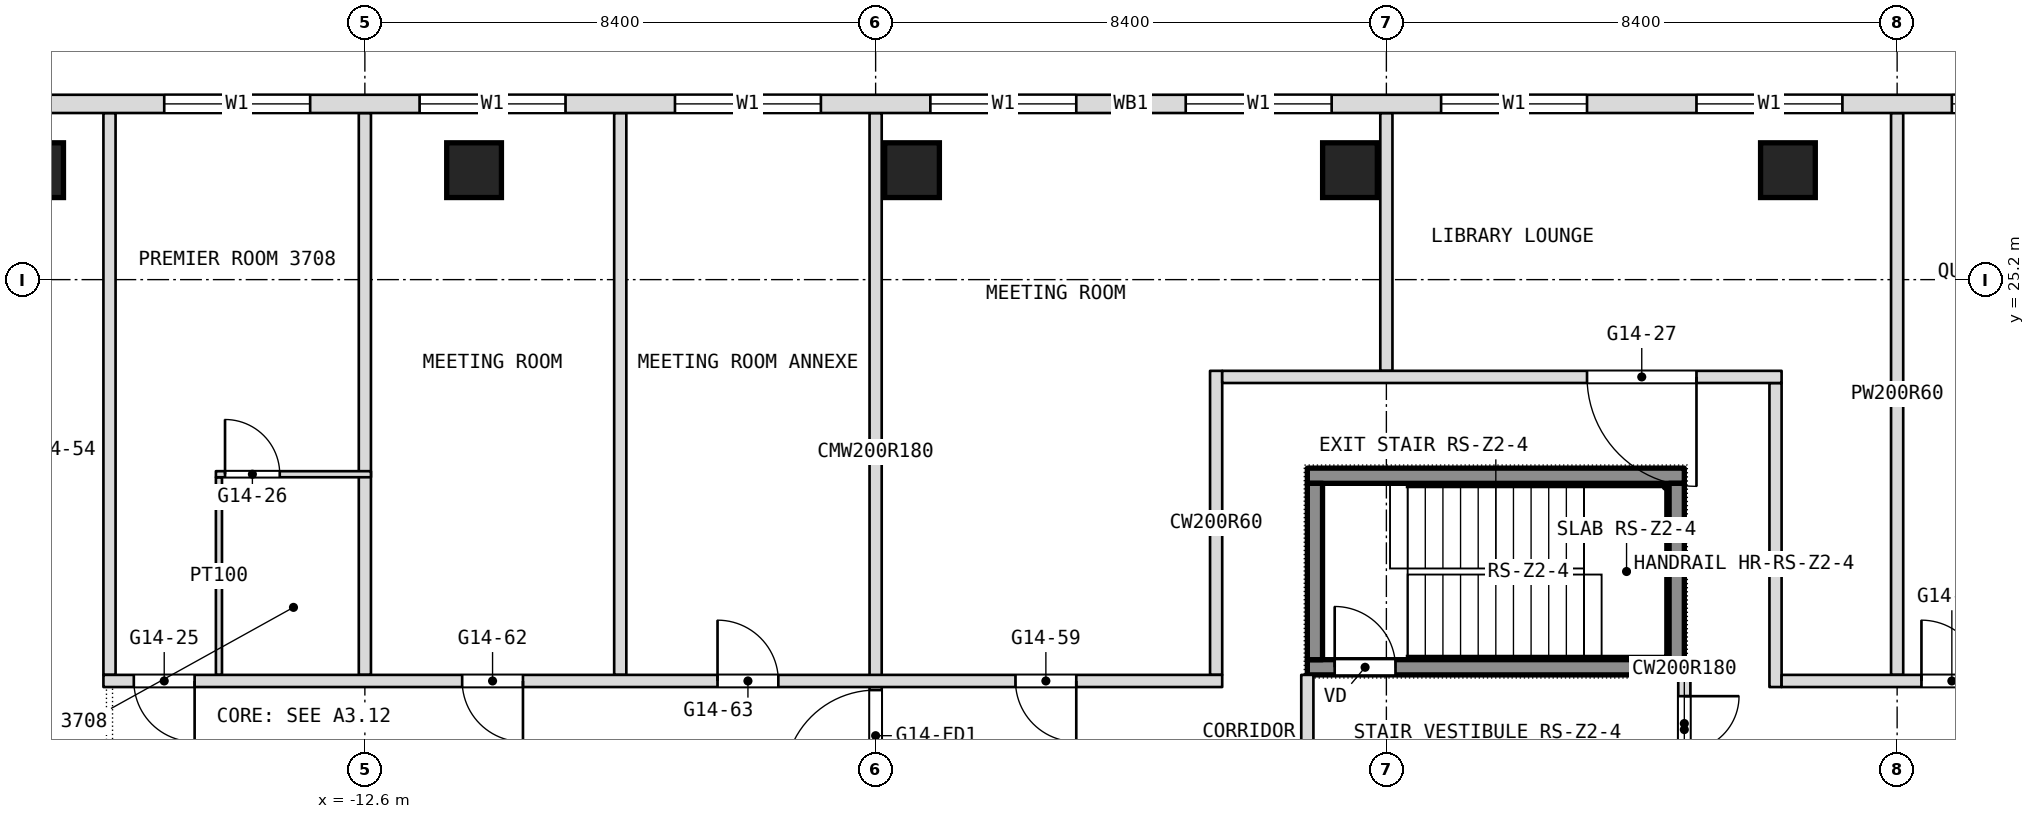
"""IFC4 building model, lengths in metres.
Left out: names, types, materials, properties, quantities, classifications, styles, units other than length and angle.
Written with IfcOpenShell. Run it as: python <this file> out.ifc"""

import sys

from ifc_helpers import new_model, si_unit, direction, frame, frame_2d, origin, origin_2d, place, context, subcontext, project, spatial, rectangle, extrude, element, fill, save


model = new_model("IFC4")
c1 = context("Model", 3, precision=1e-05, world=origin(), true_north=direction((0.0, 1.0)))
c2 = subcontext(c1, "Body", "Model", "MODEL_VIEW")
j1 = project(units=[si_unit("LENGTHUNIT", "METRE"), si_unit("PLANEANGLEUNIT", "RADIAN")], contexts=[c1])
p1 = place(None, origin())
s1 = spatial("IfcSite", under=j1, at=p1, CompositionType="ELEMENT")
p2 = place(p1, origin())
s2 = spatial("IfcBuilding", under=s1, at=p2, CompositionType="ELEMENT")
p3 = place(p2, frame((0.0, 0.0, 158.9)))
s3 = spatial("IfcBuildingStorey", under=s2, at=p3, CompositionType="ELEMENT", Elevation=158.9)
for number, where, z_axis, x_axis in (
    (1, (-18.007, 27.0, 0.0), (0.0, 0.0, 1.0), (1.0, 0.0, 0.0)),
    (2, (-10.804, 27.0, 0.0), (0.0, 0.0, 1.0), (1.0, 0.0, 0.0)),
    (3, (-3.601, 27.0, 0.0), (0.0, 0.0, 1.0), (1.0, 0.0, 0.0)),
    (4, (3.601, 27.0, 0.0), (0.0, 0.0, 1.0), (1.0, 0.0, 0.0)),
    (5, (10.804, 27.0, 0.0), (0.0, 0.0, 1.0), (1.0, 0.0, 0.0)),
):
    element("IfcColumn", number, at=place(p3, frame(where, z_axis=z_axis, x_axis=x_axis)), inside=s3, PredefinedType="COLUMN", context=c2, shape_type="SweptSolid", body=[
        extrude(rectangle(XDim=0.9, YDim=0.9, at=origin_2d()), origin(), (0.0, 0.0, 1.0), 3.6),
    ])
p4 = place(p3, frame((12.6, 18.7, 0.0), z_axis=(0.0, 0.0, 1.0), x_axis=(0.0, 1.0, 0.0)))
e6 = element("IfcWall", 6, at=p4, inside=s3, PredefinedType="PARTITIONING", context=c2, shape_type="SweptSolid", body=[
    extrude(rectangle(XDim=9.24, YDim=0.2, at=frame_2d((4.62, 0.0))), origin(), (0.0, 0.0, 1.0), 3.34),
])
p5 = place(p3, frame((10.6, 18.5, 0.0), z_axis=(0.0, 0.0, 1.0), x_axis=(0.0, 1.0, 0.0)))
e7 = element("IfcWall", 7, at=p5, inside=s3, PredefinedType="PARTITIONING", context=c2, shape_type="SweptSolid", body=[
    extrude(rectangle(XDim=5.0, YDim=0.2, at=frame_2d((2.5, 0.0))), origin(), (0.0, 0.0, 1.0), 3.34),
])
p6 = place(p3, frame((9.1, 16.9, 0.0), z_axis=(0.0, 0.0, 1.0), x_axis=(0.0, 1.0, 0.0)))
e8 = element("IfcWall", 8, at=p6, inside=s3, PredefinedType="PARTITIONING", context=c2, shape_type="SweptSolid", body=[
    extrude(rectangle(XDim=1.8, YDim=0.2, at=frame_2d((0.9, 0.0))), origin(), (0.0, 0.0, 1.0), 3.34),
])
p7 = place(p6, frame((0.55, 0.0, 0.0)))
e9 = element("IfcOpeningElement", 9, at=p7, cuts=e8, PredefinedType="OPENING", context=c2, shape_type="SweptSolid", body=[
    extrude(rectangle(XDim=0.9, YDim=2.1, at=frame_2d((0.45, 1.05))), frame((0.0, 0.1, 0.0), z_axis=(0.0, -1.0, 0.0), x_axis=(1.0, 0.0, 0.0)), (0.0, 0.0, 1.0), 0.2),
])
p8 = place(p3, frame((4.2, 23.7, 0.0), z_axis=(0.0, 0.0, 1.0), x_axis=(0.0, 1.0, 0.0)))
e10 = element("IfcWall", 10, at=p8, inside=s3, PredefinedType="PARTITIONING", context=c2, shape_type="SweptSolid", body=[
    extrude(rectangle(XDim=4.24, YDim=0.2, at=frame_2d((2.12, 0.0))), origin(), (0.0, 0.0, 1.0), 3.34),
])
p9 = place(p3, frame((2.9, 16.9, 0.0), z_axis=(0.0, 0.0, 1.0), x_axis=(0.0, 1.0, 0.0)))
e11 = element("IfcWall", 11, at=p9, inside=s3, PredefinedType="PARTITIONING", context=c2, shape_type="SweptSolid", body=[
    extrude(rectangle(XDim=1.8, YDim=0.2, at=frame_2d((0.9, 0.0))), origin(), (0.0, 0.0, 1.0), 3.34),
])
p10 = place(p3, frame((1.4, 18.7, 0.0), z_axis=(0.0, 0.0, 1.0), x_axis=(0.0, 1.0, 0.0)))
e12 = element("IfcWall", 12, at=p10, inside=s3, PredefinedType="PARTITIONING", context=c2, shape_type="SweptSolid", body=[
    extrude(rectangle(XDim=5.0, YDim=0.2, at=frame_2d((2.5, 0.0))), origin(), (0.0, 0.0, 1.0), 3.34),
])
p11 = place(p3, frame((-4.2, 16.8, 0.0), z_axis=(0.0, 0.0, 1.0), x_axis=(0.0, 1.0, 0.0)))
e13 = element("IfcWall", 13, at=p11, inside=s3, PredefinedType="PARTITIONING", context=c2, shape_type="SweptSolid", body=[
    extrude(rectangle(XDim=11.14, YDim=0.2, at=frame_2d((5.57, 0.0))), origin(), (0.0, 0.0, 1.0), 3.34),
])
p12 = place(p11, frame((0.15, 0.0, 0.0)))
e14 = element("IfcOpeningElement", 14, at=p12, cuts=e13, PredefinedType="OPENING", context=c2, shape_type="SweptSolid", body=[
    extrude(rectangle(XDim=1.5, YDim=2.1, at=frame_2d((0.75, 1.05))), frame((0.0, 0.1, 0.0), z_axis=(0.0, -1.0, 0.0), x_axis=(1.0, 0.0, 0.0)), (0.0, 0.0, 1.0), 0.2),
])
for number, where, z_axis, x_axis in (
    (15, (-8.4, 18.7, 0.0), (0.0, 0.0, 1.0), (0.0, 1.0, 0.0)),
    (16, (-12.6, 18.7, 0.0), (0.0, 0.0, 1.0), (0.0, 1.0, 0.0)),
):
    element("IfcWall", number, at=place(p3, frame(where, z_axis=z_axis, x_axis=x_axis)), inside=s3, PredefinedType="PARTITIONING", context=c2, shape_type="SweptSolid", body=[
        extrude(rectangle(XDim=9.24, YDim=0.2, at=frame_2d((4.62, 0.0))), origin(), (0.0, 0.0, 1.0), 3.34),
    ])
p13 = place(p3, frame((-15.0, 18.7, 0.0), z_axis=(0.0, 0.0, 1.0), x_axis=(0.0, 1.0, 0.0)))
e17 = element("IfcWall", 17, at=p13, inside=s3, PredefinedType="PARTITIONING", context=c2, shape_type="SweptSolid", body=[
    extrude(rectangle(XDim=3.25, YDim=0.1, at=frame_2d((1.625, 0.0))), origin(), (0.0, 0.0, 1.0), 3.34),
])
p14 = place(p3, frame((-16.8, 18.7, 0.0), z_axis=(0.0, 0.0, 1.0), x_axis=(0.0, 1.0, 0.0)))
e18 = element("IfcWall", 18, at=p14, inside=s3, PredefinedType="PARTITIONING", context=c2, shape_type="SweptSolid", body=[
    extrude(rectangle(XDim=9.24, YDim=0.2, at=frame_2d((4.62, 0.0))), origin(), (0.0, 0.0, 1.0), 3.34),
])
p15 = place(p3, frame((-16.9, 18.6, 0.0), z_axis=(0.0, 0.0, 1.0), x_axis=(1.0, 0.0, 0.0)))
e19 = element("IfcWall", 19, at=p15, inside=s3, PredefinedType="PARTITIONING", context=c2, shape_type="SweptSolid", body=[
    extrude(rectangle(XDim=18.4, YDim=0.2, at=frame_2d((9.2, 0.0))), origin(), (0.0, 0.0, 1.0), 3.34),
])
p16 = place(p15, frame((0.5, 0.0, 0.0)))
e20 = element("IfcOpeningElement", 20, at=p16, cuts=e19, PredefinedType="OPENING", context=c2, shape_type="SweptSolid", body=[
    extrude(rectangle(XDim=1.0, YDim=2.1, at=frame_2d((0.5, 1.05))), frame((0.0, 0.1, 0.0), z_axis=(0.0, -1.0, 0.0), x_axis=(1.0, 0.0, 0.0)), (0.0, 0.0, 1.0), 0.2),
])
p17 = place(p15, frame((15.0, 0.0, 0.0)))
e21 = element("IfcOpeningElement", 21, at=p17, cuts=e19, PredefinedType="OPENING", context=c2, shape_type="SweptSolid", body=[
    extrude(rectangle(XDim=1.0, YDim=2.1, at=frame_2d((0.5, 1.05))), frame((0.0, 0.1, 0.0), z_axis=(0.0, -1.0, 0.0), x_axis=(1.0, 0.0, 0.0)), (0.0, 0.0, 1.0), 0.2),
])
p18 = place(p15, frame((5.9, 0.0, 0.0)))
e22 = element("IfcOpeningElement", 22, at=p18, cuts=e19, PredefinedType="OPENING", context=c2, shape_type="SweptSolid", body=[
    extrude(rectangle(XDim=1.0, YDim=2.1, at=frame_2d((0.5, 1.05))), frame((0.0, 0.1, 0.0), z_axis=(0.0, -1.0, 0.0), x_axis=(1.0, 0.0, 0.0)), (0.0, 0.0, 1.0), 0.2),
])
p19 = place(p15, frame((10.1, 0.0, 0.0)))
e23 = element("IfcOpeningElement", 23, at=p19, cuts=e19, PredefinedType="OPENING", context=c2, shape_type="SweptSolid", body=[
    extrude(rectangle(XDim=1.0, YDim=2.1, at=frame_2d((0.5, 1.05))), frame((0.0, 0.1, 0.0), z_axis=(0.0, -1.0, 0.0), x_axis=(1.0, 0.0, 0.0)), (0.0, 0.0, 1.0), 0.2),
])
p20 = place(p3, frame((10.7, 18.6, 0.0), z_axis=(0.0, 0.0, 1.0), x_axis=(1.0, 0.0, 0.0)))
e24 = element("IfcWall", 24, at=p20, inside=s3, PredefinedType="PARTITIONING", context=c2, shape_type="SweptSolid", body=[
    extrude(rectangle(XDim=6.2, YDim=0.2, at=frame_2d((3.1, 0.0))), origin(), (0.0, 0.0, 1.0), 3.34),
])
p21 = place(p20, frame((2.3, 0.0, 0.0)))
e25 = element("IfcOpeningElement", 25, at=p21, cuts=e24, PredefinedType="OPENING", context=c2, shape_type="SweptSolid", body=[
    extrude(rectangle(XDim=1.0, YDim=2.1, at=frame_2d((0.5, 1.05))), frame((0.0, 0.1, 0.0), z_axis=(0.0, -1.0, 0.0), x_axis=(1.0, 0.0, 0.0)), (0.0, 0.0, 1.0), 0.2),
])
p22 = place(p3, frame((-15.05, 22.0, 0.0), z_axis=(0.0, 0.0, 1.0), x_axis=(1.0, 0.0, 0.0)))
e26 = element("IfcWall", 26, at=p22, inside=s3, PredefinedType="PARTITIONING", context=c2, shape_type="SweptSolid", body=[
    extrude(rectangle(XDim=2.55, YDim=0.1, at=frame_2d((1.275, 0.0))), origin(), (0.0, 0.0, 1.0), 3.34),
])
p23 = place(p22, frame((0.15, 0.0, 0.0)))
e27 = element("IfcOpeningElement", 27, at=p23, cuts=e26, PredefinedType="OPENING", context=c2, shape_type="SweptSolid", body=[
    extrude(rectangle(XDim=0.9, YDim=2.1, at=frame_2d((0.45, 1.05))), frame((0.0, 0.05, 0.0), z_axis=(0.0, -1.0, 0.0), x_axis=(1.0, 0.0, 0.0)), (0.0, 0.0, 1.0), 0.1),
])
p24 = place(p3, frame((1.5, 23.6, 0.0), z_axis=(0.0, 0.0, 1.0), x_axis=(1.0, 0.0, 0.0)))
e28 = element("IfcWall", 28, at=p24, inside=s3, PredefinedType="PARTITIONING", context=c2, shape_type="SweptSolid", body=[
    extrude(rectangle(XDim=9.2, YDim=0.2, at=frame_2d((4.6, 0.0))), origin(), (0.0, 0.0, 1.0), 3.34),
])
p25 = place(p24, frame((6.0, 0.0, 0.0)))
e29 = element("IfcOpeningElement", 29, at=p25, cuts=e28, PredefinedType="OPENING", context=c2, shape_type="SweptSolid", body=[
    extrude(rectangle(XDim=1.8, YDim=2.1, at=frame_2d((0.9, 1.05))), frame((0.0, 0.1, 0.0), z_axis=(0.0, -1.0, 0.0), x_axis=(1.0, 0.0, 0.0)), (0.0, 0.0, 1.0), 0.2),
])
p26 = place(p3, frame((21.306, 28.09, 0.0), z_axis=(0.0, 0.0, 1.0), x_axis=(-1.0, 0.0, 0.0)))
e30 = element("IfcWall", 30, at=p26, inside=s3, PredefinedType="NOTDEFINED", context=c2, shape_type="SweptSolid", body=[
    extrude(rectangle(XDim=42.612, YDim=0.3, at=frame_2d((21.306, 0.0))), origin(), (0.0, 0.0, 1.0), 3.6),
])
p27 = place(p26, frame((5.406, 0.0, 0.9)))
e31 = element("IfcOpeningElement", 31, at=p27, cuts=e30, PredefinedType="OPENING", context=c2, shape_type="SweptSolid", body=[
    extrude(rectangle(XDim=2.4, YDim=2.1, at=frame_2d((1.2, 1.05))), frame((0.0, 0.15, 0.0), z_axis=(0.0, -1.0, 0.0), x_axis=(1.0, 0.0, 0.0)), (0.0, 0.0, 1.0), 0.3),
])
p28 = place(p26, frame((9.606, 0.0, 0.9)))
e32 = element("IfcOpeningElement", 32, at=p28, cuts=e30, PredefinedType="OPENING", context=c2, shape_type="SweptSolid", body=[
    extrude(rectangle(XDim=2.4, YDim=2.1, at=frame_2d((1.2, 1.05))), frame((0.0, 0.15, 0.0), z_axis=(0.0, -1.0, 0.0), x_axis=(1.0, 0.0, 0.0)), (0.0, 0.0, 1.0), 0.3),
])
p29 = place(p26, frame((13.806, 0.0, 0.9)))
e33 = element("IfcOpeningElement", 33, at=p29, cuts=e30, PredefinedType="OPENING", context=c2, shape_type="SweptSolid", body=[
    extrude(rectangle(XDim=2.4, YDim=2.1, at=frame_2d((1.2, 1.05))), frame((0.0, 0.15, 0.0), z_axis=(0.0, -1.0, 0.0), x_axis=(1.0, 0.0, 0.0)), (0.0, 0.0, 1.0), 0.3),
])
p30 = place(p26, frame((18.006, 0.0, 0.9)))
e34 = element("IfcOpeningElement", 34, at=p30, cuts=e30, PredefinedType="OPENING", context=c2, shape_type="SweptSolid", body=[
    extrude(rectangle(XDim=2.4, YDim=2.1, at=frame_2d((1.2, 1.05))), frame((0.0, 0.15, 0.0), z_axis=(0.0, -1.0, 0.0), x_axis=(1.0, 0.0, 0.0)), (0.0, 0.0, 1.0), 0.3),
])
p31 = place(p26, frame((22.206, 0.0, 0.9)))
e35 = element("IfcOpeningElement", 35, at=p31, cuts=e30, PredefinedType="OPENING", context=c2, shape_type="SweptSolid", body=[
    extrude(rectangle(XDim=2.4, YDim=2.1, at=frame_2d((1.2, 1.05))), frame((0.0, 0.15, 0.0), z_axis=(0.0, -1.0, 0.0), x_axis=(1.0, 0.0, 0.0)), (0.0, 0.0, 1.0), 0.3),
])
p32 = place(p26, frame((26.406, 0.0, 0.9)))
e36 = element("IfcOpeningElement", 36, at=p32, cuts=e30, PredefinedType="OPENING", context=c2, shape_type="SweptSolid", body=[
    extrude(rectangle(XDim=2.4, YDim=2.1, at=frame_2d((1.2, 1.05))), frame((0.0, 0.15, 0.0), z_axis=(0.0, -1.0, 0.0), x_axis=(1.0, 0.0, 0.0)), (0.0, 0.0, 1.0), 0.3),
])
p33 = place(p26, frame((30.606, 0.0, 0.9)))
e37 = element("IfcOpeningElement", 37, at=p33, cuts=e30, PredefinedType="OPENING", context=c2, shape_type="SweptSolid", body=[
    extrude(rectangle(XDim=2.4, YDim=2.1, at=frame_2d((1.2, 1.05))), frame((0.0, 0.15, 0.0), z_axis=(0.0, -1.0, 0.0), x_axis=(1.0, 0.0, 0.0)), (0.0, 0.0, 1.0), 0.3),
])
p34 = place(p26, frame((34.806, 0.0, 0.9)))
e38 = element("IfcOpeningElement", 38, at=p34, cuts=e30, PredefinedType="OPENING", context=c2, shape_type="SweptSolid", body=[
    extrude(rectangle(XDim=2.4, YDim=2.1, at=frame_2d((1.2, 1.05))), frame((0.0, 0.15, 0.0), z_axis=(0.0, -1.0, 0.0), x_axis=(1.0, 0.0, 0.0)), (0.0, 0.0, 1.0), 0.3),
])
p35 = place(p3, frame((2.9, 18.825, 0.1), z_axis=(0.0, 0.0, 1.0), x_axis=(1.0, 0.0, 0.0)))
e39 = element("IfcWall", 39, at=p35, inside=s3, PredefinedType="SHEAR", context=c2, shape_type="SweptSolid", body=[
    extrude(rectangle(XDim=6.2, YDim=0.25, at=frame_2d((3.1, 0.0))), origin(), (0.0, 0.0, 1.0), 3.6),
])
p36 = place(p35, frame((0.45, 0.0, 0.0)))
e40 = element("IfcOpeningElement", 40, at=p36, cuts=e39, PredefinedType="OPENING", context=c2, shape_type="SweptSolid", body=[
    extrude(rectangle(XDim=1.0, YDim=2.1, at=frame_2d((0.5, 1.05))), frame((0.0, 0.125, 0.0), z_axis=(0.0, -1.0, 0.0), x_axis=(1.0, 0.0, 0.0)), (0.0, 0.0, 1.0), 0.25),
])
p37 = place(p3, frame((2.9, 21.975, 0.1), z_axis=(0.0, 0.0, 1.0), x_axis=(1.0, 0.0, 0.0)))
e41 = element("IfcWall", 41, at=p37, inside=s3, PredefinedType="SHEAR", context=c2, shape_type="SweptSolid", body=[
    extrude(rectangle(XDim=6.2, YDim=0.25, at=frame_2d((3.1, 0.0))), origin(), (0.0, 0.0, 1.0), 3.6),
])
for number, where, z_axis, x_axis in (
    (42, (3.025, 18.95, 0.1), (0.0, 0.0, 1.0), (0.0, 1.0, 0.0)),
    (43, (8.975, 18.95, 0.1), (0.0, 0.0, 1.0), (0.0, 1.0, 0.0)),
):
    element("IfcWall", number, at=place(p3, frame(where, z_axis=z_axis, x_axis=x_axis)), inside=s3, PredefinedType="SHEAR", context=c2, shape_type="SweptSolid", body=[
        extrude(rectangle(XDim=2.9, YDim=0.25, at=frame_2d((1.45, 0.0))), origin(), (0.0, 0.0, 1.0), 3.6),
    ])
p38 = place(p7, origin())
e44 = element("IfcDoor", 44, at=p38, inside=s3, OperationType="SINGLE_SWING_RIGHT", PredefinedType="DOOR", context=c2, shape_type="SweptSolid", body=[
    extrude(rectangle(XDim=0.9, YDim=2.1, at=frame_2d((0.45, 1.05))), frame((0.0, 0.025, 0.0), z_axis=(0.0, -1.0, 0.0), x_axis=(1.0, 0.0, 0.0)), (0.0, 0.0, 1.0), 0.05),
])
fill(e9, e44)
p39 = place(p16, origin())
e45 = element("IfcDoor", 45, at=p39, inside=s3, OperationType="SINGLE_SWING_RIGHT", PredefinedType="DOOR", context=c2, shape_type="SweptSolid", body=[
    extrude(rectangle(XDim=1.0, YDim=2.1, at=frame_2d((0.5, 1.05))), frame((0.0, 0.025, 0.0), z_axis=(0.0, -1.0, 0.0), x_axis=(1.0, 0.0, 0.0)), (0.0, 0.0, 1.0), 0.05),
])
fill(e20, e45)
p40 = place(p17, origin())
e46 = element("IfcDoor", 46, at=p40, inside=s3, OperationType="SINGLE_SWING_RIGHT", PredefinedType="DOOR", context=c2, shape_type="SweptSolid", body=[
    extrude(rectangle(XDim=1.0, YDim=2.1, at=frame_2d((0.5, 1.05))), frame((0.0, 0.025, 0.0), z_axis=(0.0, -1.0, 0.0), x_axis=(1.0, 0.0, 0.0)), (0.0, 0.0, 1.0), 0.05),
])
fill(e21, e46)
p41 = place(p18, origin())
e47 = element("IfcDoor", 47, at=p41, inside=s3, OperationType="SINGLE_SWING_LEFT", PredefinedType="DOOR", context=c2, shape_type="SweptSolid", body=[
    extrude(rectangle(XDim=1.0, YDim=2.1, at=frame_2d((0.5, 1.05))), frame((0.0, 0.025, 0.0), z_axis=(0.0, -1.0, 0.0), x_axis=(1.0, 0.0, 0.0)), (0.0, 0.0, 1.0), 0.05),
])
fill(e22, e47)
p42 = place(p19, origin())
e48 = element("IfcDoor", 48, at=p42, inside=s3, OperationType="SINGLE_SWING_RIGHT", PredefinedType="DOOR", context=c2, shape_type="SweptSolid", body=[
    extrude(rectangle(XDim=1.0, YDim=2.1, at=frame_2d((0.5, 1.05))), frame((0.0, 0.025, 0.0), z_axis=(0.0, -1.0, 0.0), x_axis=(1.0, 0.0, 0.0)), (0.0, 0.0, 1.0), 0.05),
])
fill(e23, e48)
p43 = place(p21, origin())
e49 = element("IfcDoor", 49, at=p43, inside=s3, OperationType="SINGLE_SWING_LEFT", PredefinedType="DOOR", context=c2, shape_type="SweptSolid", body=[
    extrude(rectangle(XDim=1.0, YDim=2.1, at=frame_2d((0.5, 1.05))), frame((0.0, 0.025, 0.0), z_axis=(0.0, -1.0, 0.0), x_axis=(1.0, 0.0, 0.0)), (0.0, 0.0, 1.0), 0.05),
])
fill(e25, e49)
p44 = place(p23, origin())
e50 = element("IfcDoor", 50, at=p44, inside=s3, OperationType="SINGLE_SWING_RIGHT", PredefinedType="DOOR", context=c2, shape_type="SweptSolid", body=[
    extrude(rectangle(XDim=0.9, YDim=2.1, at=frame_2d((0.45, 1.05))), frame((0.0, 0.025, 0.0), z_axis=(0.0, -1.0, 0.0), x_axis=(1.0, 0.0, 0.0)), (0.0, 0.0, 1.0), 0.05),
])
fill(e27, e50)
p45 = place(p25, origin())
e51 = element("IfcDoor", 51, at=p45, inside=s3, OperationType="DOUBLE_DOOR_SINGLE_SWING", PredefinedType="DOOR", context=c2, shape_type="SweptSolid", body=[
    extrude(rectangle(XDim=1.8, YDim=2.1, at=frame_2d((0.9, 1.05))), frame((0.0, 0.025, 0.0), z_axis=(0.0, -1.0, 0.0), x_axis=(1.0, 0.0, 0.0)), (0.0, 0.0, 1.0), 0.05),
])
fill(e29, e51)
p46 = place(p27, origin())
e52 = element("IfcWindow", 52, at=p46, inside=s3, PartitioningType="SINGLE_PANEL", PredefinedType="WINDOW", context=c2, shape_type="SweptSolid", body=[
    extrude(rectangle(XDim=2.4, YDim=2.1, at=frame_2d((1.2, 1.05))), frame((0.0, 0.03, 0.0), z_axis=(0.0, -1.0, 0.0), x_axis=(1.0, 0.0, 0.0)), (0.0, 0.0, 1.0), 0.06),
])
fill(e31, e52)
p47 = place(p28, origin())
e53 = element("IfcWindow", 53, at=p47, inside=s3, PartitioningType="SINGLE_PANEL", PredefinedType="WINDOW", context=c2, shape_type="SweptSolid", body=[
    extrude(rectangle(XDim=2.4, YDim=2.1, at=frame_2d((1.2, 1.05))), frame((0.0, 0.03, 0.0), z_axis=(0.0, -1.0, 0.0), x_axis=(1.0, 0.0, 0.0)), (0.0, 0.0, 1.0), 0.06),
])
fill(e32, e53)
p48 = place(p29, origin())
e54 = element("IfcWindow", 54, at=p48, inside=s3, PartitioningType="SINGLE_PANEL", PredefinedType="WINDOW", context=c2, shape_type="SweptSolid", body=[
    extrude(rectangle(XDim=2.4, YDim=2.1, at=frame_2d((1.2, 1.05))), frame((0.0, 0.03, 0.0), z_axis=(0.0, -1.0, 0.0), x_axis=(1.0, 0.0, 0.0)), (0.0, 0.0, 1.0), 0.06),
])
fill(e33, e54)
p49 = place(p30, origin())
e55 = element("IfcWindow", 55, at=p49, inside=s3, PartitioningType="SINGLE_PANEL", PredefinedType="WINDOW", context=c2, shape_type="SweptSolid", body=[
    extrude(rectangle(XDim=2.4, YDim=2.1, at=frame_2d((1.2, 1.05))), frame((0.0, 0.03, 0.0), z_axis=(0.0, -1.0, 0.0), x_axis=(1.0, 0.0, 0.0)), (0.0, 0.0, 1.0), 0.06),
])
fill(e34, e55)
p50 = place(p31, origin())
e56 = element("IfcWindow", 56, at=p50, inside=s3, PartitioningType="SINGLE_PANEL", PredefinedType="WINDOW", context=c2, shape_type="SweptSolid", body=[
    extrude(rectangle(XDim=2.4, YDim=2.1, at=frame_2d((1.2, 1.05))), frame((0.0, 0.03, 0.0), z_axis=(0.0, -1.0, 0.0), x_axis=(1.0, 0.0, 0.0)), (0.0, 0.0, 1.0), 0.06),
])
fill(e35, e56)
p51 = place(p32, origin())
e57 = element("IfcWindow", 57, at=p51, inside=s3, PartitioningType="SINGLE_PANEL", PredefinedType="WINDOW", context=c2, shape_type="SweptSolid", body=[
    extrude(rectangle(XDim=2.4, YDim=2.1, at=frame_2d((1.2, 1.05))), frame((0.0, 0.03, 0.0), z_axis=(0.0, -1.0, 0.0), x_axis=(1.0, 0.0, 0.0)), (0.0, 0.0, 1.0), 0.06),
])
fill(e36, e57)
p52 = place(p33, origin())
e58 = element("IfcWindow", 58, at=p52, inside=s3, PartitioningType="SINGLE_PANEL", PredefinedType="WINDOW", context=c2, shape_type="SweptSolid", body=[
    extrude(rectangle(XDim=2.4, YDim=2.1, at=frame_2d((1.2, 1.05))), frame((0.0, 0.03, 0.0), z_axis=(0.0, -1.0, 0.0), x_axis=(1.0, 0.0, 0.0)), (0.0, 0.0, 1.0), 0.06),
])
fill(e37, e58)
p53 = place(p34, origin())
e59 = element("IfcWindow", 59, at=p53, inside=s3, PartitioningType="SINGLE_PANEL", PredefinedType="WINDOW", context=c2, shape_type="SweptSolid", body=[
    extrude(rectangle(XDim=2.4, YDim=2.1, at=frame_2d((1.2, 1.05))), frame((0.0, 0.03, 0.0), z_axis=(0.0, -1.0, 0.0), x_axis=(1.0, 0.0, 0.0)), (0.0, 0.0, 1.0), 0.06),
])
fill(e38, e59)
p54 = place(p36, origin())
e60 = element("IfcDoor", 60, at=p54, inside=s3, OperationType="SINGLE_SWING_LEFT", PredefinedType="DOOR", context=c2, shape_type="SweptSolid", body=[
    extrude(rectangle(XDim=1.0, YDim=2.1, at=frame_2d((0.5, 1.05))), frame((0.0, 0.025, 0.0), z_axis=(0.0, -1.0, 0.0), x_axis=(1.0, 0.0, 0.0)), (0.0, 0.0, 1.0), 0.05),
])
fill(e40, e60)
p55 = place(p12, origin())
e61 = element("IfcDoor", 61, at=p55, inside=s3, OperationType="DOUBLE_DOOR_DOUBLE_SWING", PredefinedType="DOOR", context=c2, shape_type="SweptSolid", body=[
    extrude(rectangle(XDim=1.5, YDim=2.1, at=frame_2d((0.75, 1.05))), frame((0.0, 0.025, 0.0), z_axis=(0.0, -1.0, 0.0), x_axis=(1.0, 0.0, 0.0)), (0.0, 0.0, 1.0), 0.05),
])
fill(e14, e61)
save(model, sys.argv[1])
